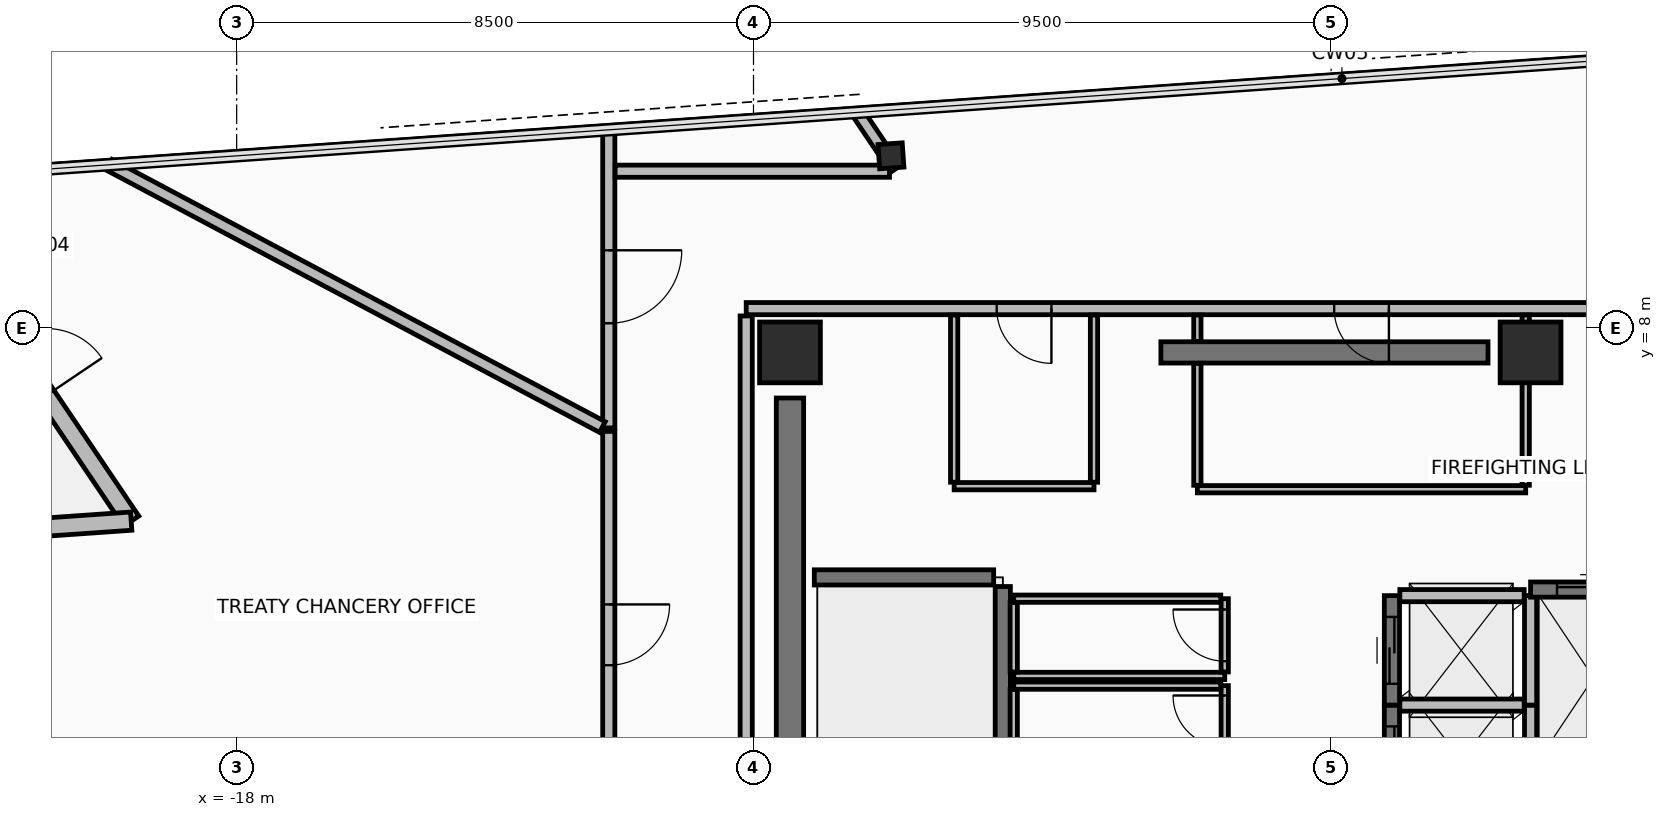
"""IFC4 building model, lengths in metres.
Left out: names, types, materials, properties, quantities, classifications, styles, units other than length and angle.
Written with IfcOpenShell. Run it as: python <this file> out.ifc"""

import sys

from ifc_helpers import new_model, si_unit, direction, frame, frame_2d, origin, origin_2d, place, context, subcontext, project, spatial, rectangle, hollow_rectangle, extrude, element, fill, save


model = new_model("IFC4")
c1 = context("Model", 3, precision=1e-05, world=origin(), true_north=direction((0.0, 1.0)))
c2 = subcontext(c1, "Body", "Model", "MODEL_VIEW")
j1 = project(units=[si_unit("LENGTHUNIT", "METRE"), si_unit("PLANEANGLEUNIT", "RADIAN")], contexts=[c1])
p1 = place(None, origin())
s1 = spatial("IfcSite", under=j1, at=p1, CompositionType="ELEMENT")
p2 = place(p1, origin())
s2 = spatial("IfcBuilding", under=s1, at=p2, CompositionType="ELEMENT")
p3 = place(p2, frame((0.0, 0.0, 275.0)))
s3 = spatial("IfcBuildingStorey", under=s2, at=p3, CompositionType="ELEMENT", Elevation=275.0)
for number, where, z_axis, x_axis in (
    (1, (3.28, 7.6, 0.0), (0.0, 0.0, 1.0), (1.0, 0.0, 0.0)),
    (2, (-8.9, 7.6, 0.0), (0.0, 0.0, 1.0), (1.0, 0.0, 0.0)),
):
    element("IfcColumn", number, at=place(p3, frame(where, z_axis=z_axis, x_axis=x_axis)), inside=s3, PredefinedType="COLUMN", context=c2, shape_type="SweptSolid", body=[
        extrude(rectangle(XDim=1.0, YDim=1.0, at=origin_2d()), origin(), (0.0, 0.0, 1.0), 4.75),
    ])
p4 = place(p3, frame((-7.24, 10.833, 0.0), z_axis=(0.0, 0.0, 1.0), x_axis=(0.99756392851, 0.069758214822, 0.0)))
e3 = element("IfcColumn", 3, at=p4, inside=s3, PredefinedType="COLUMN", context=c2, shape_type="SweptSolid", body=[
    extrude(hollow_rectangle(XDim=0.4, YDim=0.4, WallThickness=0.025, at=origin_2d()), origin(), (0.0, 0.0, 1.0), 4.75),
])
p5 = place(p3, frame((-23.526, 10.446, 0.0), z_axis=(0.0, 0.0, 1.0), x_axis=(0.559187716425, -0.829041071238, 0.0)))
e4 = element("IfcWall", 4, at=p5, inside=s3, PredefinedType="STANDARD", context=c2, shape_type="SweptSolid", body=[
    extrude(rectangle(XDim=6.78, YDim=0.3, at=frame_2d((3.39, 0.0))), origin(), (0.0, 0.0, 1.0), 2.255),
])
p6 = place(p5, frame((3.186, 0.0, 0.0)))
e5 = element("IfcOpeningElement", 5, at=p6, cuts=e4, PredefinedType="OPENING", context=c2, shape_type="SweptSolid", body=[
    extrude(rectangle(XDim=1.1, YDim=2.2, at=frame_2d((0.55, 1.1))), frame((0.0, 0.16, 0.0), z_axis=(0.0, -1.0, 0.0), x_axis=(1.0, 0.0, 0.0)), (0.0, 0.0, 1.0), 0.32),
])
p7 = place(p3, frame((-19.735, 4.825, 0.0), z_axis=(0.0, 0.0, 1.0), x_axis=(-0.997564507468, -0.06974993506, 0.0)))
e6 = element("IfcWall", 6, at=p7, inside=s3, PredefinedType="STANDARD", context=c2, shape_type="SweptSolid", body=[
    extrude(rectangle(XDim=6.78, YDim=0.3, at=frame_2d((3.39, 0.0))), origin(), (0.0, 0.0, 1.0), 2.255),
])
p8 = place(p3, frame((-2.8, 7.6, 0.0), z_axis=(0.0, 0.0, 1.0), x_axis=(1.0, 0.0, 0.0)))
e7 = element("IfcWall", 7, at=p8, inside=s3, PredefinedType="SHEAR", context=c2, shape_type="SweptSolid", body=[
    extrude(rectangle(XDim=5.38, YDim=0.35, at=frame_2d((2.69, 0.0))), origin(), (0.0, 0.0, 1.0), 4.56),
])
p9 = place(p3, frame((-8.9, -3.85, 0.0), z_axis=(0.0, 0.0, 1.0), x_axis=(0.0, 1.0, 0.0)))
e8 = element("IfcWall", 8, at=p9, inside=s3, PredefinedType="SHEAR", context=c2, shape_type="SweptSolid", body=[
    extrude(rectangle(XDim=10.7, YDim=0.45, at=frame_2d((5.35, 0.0))), origin(), (0.0, 0.0, 1.0), 4.56),
])
p10 = place(p3, frame((9.62, 8.32, 0.0), z_axis=(0.0, 0.0, 1.0), x_axis=(-1.0, 0.0, 0.0)))
e9 = element("IfcWall", 9, at=p10, inside=s3, PredefinedType="PARTITIONING", context=c2, shape_type="SweptSolid", body=[
    extrude(rectangle(XDim=19.24, YDim=0.2, at=frame_2d((9.62, 0.0))), origin(), (0.0, 0.0, 1.0), 2.355),
])
p11 = place(p10, frame((8.67, 0.0, 0.0)))
e10 = element("IfcOpeningElement", 10, at=p11, cuts=e9, PredefinedType="OPENING", context=c2, shape_type="SweptSolid", body=[
    extrude(rectangle(XDim=0.9, YDim=2.1, at=frame_2d((0.45, 1.05))), frame((0.0, 0.11, 0.0), z_axis=(0.0, -1.0, 0.0), x_axis=(1.0, 0.0, 0.0)), (0.0, 0.0, 1.0), 0.22),
])
p12 = place(p10, frame((14.22, 0.0, 0.0)))
e11 = element("IfcOpeningElement", 11, at=p12, cuts=e9, PredefinedType="OPENING", context=c2, shape_type="SweptSolid", body=[
    extrude(rectangle(XDim=0.9, YDim=2.1, at=frame_2d((0.45, 1.05))), frame((0.0, 0.11, 0.0), z_axis=(0.0, -1.0, 0.0), x_axis=(1.0, 0.0, 0.0)), (0.0, 0.0, 1.0), 0.22),
])
p13 = place(p3, frame((-9.62, 8.2, 0.0), z_axis=(0.0, 0.0, 1.0), x_axis=(0.0, -1.0, 0.0)))
e12 = element("IfcWall", 12, at=p13, inside=s3, PredefinedType="PARTITIONING", context=c2, shape_type="SweptSolid", body=[
    extrude(rectangle(XDim=16.4, YDim=0.2, at=frame_2d((8.2, 0.0))), origin(), (0.0, 0.0, 1.0), 2.355),
])
p14 = place(p13, frame((12.65, 0.0, 0.0)))
e13 = element("IfcOpeningElement", 13, at=p14, cuts=e12, PredefinedType="OPENING", context=c2, shape_type="SweptSolid", body=[
    extrude(rectangle(XDim=1.1, YDim=2.15, at=frame_2d((0.55, 1.075))), frame((0.0, 0.11, 0.0), z_axis=(0.0, -1.0, 0.0), x_axis=(1.0, 0.0, 0.0)), (0.0, 0.0, 1.0), 0.22),
])
p15 = place(p3, frame((-5.4, -3.55, 0.0), z_axis=(0.0, 0.0, 1.0), x_axis=(0.0, 1.0, 0.0)))
e14 = element("IfcWall", 14, at=p15, inside=s3, PredefinedType="SHEAR", context=c2, shape_type="SweptSolid", body=[
    extrude(rectangle(XDim=7.3, YDim=0.25, at=frame_2d((3.65, 0.0))), origin(), (0.0, 0.0, 1.0), 4.56),
])
p16 = place(p3, frame((-8.5, 3.9, 0.0), z_axis=(0.0, 0.0, 1.0), x_axis=(1.0, 0.0, 0.0)))
e15 = element("IfcWall", 15, at=p16, inside=s3, PredefinedType="SHEAR", context=c2, shape_type="SweptSolid", body=[
    extrude(rectangle(XDim=2.95, YDim=0.25, at=frame_2d((1.475, 0.0))), origin(), (0.0, 0.0, 1.0), 4.56),
])
p17 = place(p3, frame((1.0, 0.0, 0.0), z_axis=(0.0, 0.0, 1.0), x_axis=(0.0, 1.0, 0.0)))
e16 = element("IfcWall", 16, at=p17, inside=s3, PredefinedType="SHEAR", context=c2, shape_type="SweptSolid", body=[
    extrude(rectangle(XDim=1.8, YDim=0.25, at=frame_2d((0.9, 0.0))), origin(), (0.0, 0.0, 1.0), 4.56),
])
p18 = place(p17, frame((0.35, 0.0, 0.0)))
e17 = element("IfcOpeningElement", 17, at=p18, cuts=e16, PredefinedType="OPENING", context=c2, shape_type="SweptSolid", body=[
    extrude(rectangle(XDim=1.1, YDim=2.2, at=frame_2d((0.55, 1.1))), frame((0.0, 0.135, 0.0), z_axis=(0.0, -1.0, 0.0), x_axis=(1.0, 0.0, 0.0)), (0.0, 0.0, 1.0), 0.27),
])
p19 = place(p3, frame((3.28, 0.0, 0.0), z_axis=(0.0, 0.0, 1.0), x_axis=(0.0, 1.0, 0.0)))
e18 = element("IfcWall", 18, at=p19, inside=s3, PredefinedType="PARTITIONING", context=c2, shape_type="SweptSolid", body=[
    extrude(rectangle(XDim=1.8, YDim=0.2, at=frame_2d((0.9, 0.0))), origin(), (0.0, 0.0, 1.0), 4.56),
])
p20 = place(p3, frame((1.13, 1.8, 0.0), z_axis=(0.0, 0.0, 1.0), x_axis=(1.0, 0.0, 0.0)))
e19 = element("IfcWall", 19, at=p20, inside=s3, PredefinedType="PARTITIONING", context=c2, shape_type="SweptSolid", body=[
    extrude(rectangle(XDim=2.045, YDim=0.2, at=frame_2d((1.022, 0.0))), origin(), (0.0, 0.0, 1.0), 4.56),
])
p21 = place(p3, frame((1.0, 1.8, 0.0), z_axis=(0.0, 0.0, 1.0), x_axis=(0.0, 1.0, 0.0)))
e20 = element("IfcWall", 20, at=p21, inside=s3, PredefinedType="SHEAR", context=c2, shape_type="SweptSolid", body=[
    extrude(rectangle(XDim=1.8, YDim=0.25, at=frame_2d((0.9, 0.0))), origin(), (0.0, 0.0, 1.0), 4.56),
])
p22 = place(p21, frame((0.35, 0.0, 0.0)))
e21 = element("IfcOpeningElement", 21, at=p22, cuts=e20, PredefinedType="OPENING", context=c2, shape_type="SweptSolid", body=[
    extrude(rectangle(XDim=1.1, YDim=2.2, at=frame_2d((0.55, 1.1))), frame((0.0, 0.135, 0.0), z_axis=(0.0, -1.0, 0.0), x_axis=(1.0, 0.0, 0.0)), (0.0, 0.0, 1.0), 0.27),
])
p23 = place(p3, frame((3.28, 1.8, 0.0), z_axis=(0.0, 0.0, 1.0), x_axis=(0.0, 1.0, 0.0)))
e22 = element("IfcWall", 22, at=p23, inside=s3, PredefinedType="PARTITIONING", context=c2, shape_type="SweptSolid", body=[
    extrude(rectangle(XDim=1.8, YDim=0.2, at=frame_2d((0.9, 0.0))), origin(), (0.0, 0.0, 1.0), 4.56),
])
p24 = place(p3, frame((1.13, 3.6, 0.0), z_axis=(0.0, 0.0, 1.0), x_axis=(1.0, 0.0, 0.0)))
e23 = element("IfcWall", 23, at=p24, inside=s3, PredefinedType="PARTITIONING", context=c2, shape_type="SweptSolid", body=[
    extrude(rectangle(XDim=2.045, YDim=0.2, at=frame_2d((1.022, 0.0))), origin(), (0.0, 0.0, 1.0), 3.855),
])
p25 = place(p3, frame((3.28, 3.7, 0.0), z_axis=(0.0, 0.0, 1.0), x_axis=(1.0, 0.0, 0.0)))
e24 = element("IfcWall", 24, at=p25, inside=s3, PredefinedType="SHEAR", context=c2, shape_type="SweptSolid", body=[
    extrude(rectangle(XDim=2.07, YDim=0.25, at=frame_2d((1.035, 0.0))), origin(), (0.0, 0.0, 1.0), 4.56),
])
p26 = place(p25, frame((0.435, 0.0, 0.0)))
e25 = element("IfcOpeningElement", 25, at=p26, cuts=e24, PredefinedType="OPENING", context=c2, shape_type="SweptSolid", body=[
    extrude(rectangle(XDim=1.2, YDim=2.2, at=frame_2d((0.6, 1.1))), frame((0.0, 0.135, 0.0), z_axis=(0.0, -1.0, 0.0), x_axis=(1.0, 0.0, 0.0)), (0.0, 0.0, 1.0), 0.27),
])
p27 = place(p3, frame((-5.22, 2.28, 0.0), z_axis=(0.0, 0.0, 1.0), x_axis=(1.0, 0.0, 0.0)))
e26 = element("IfcWall", 26, at=p27, inside=s3, PredefinedType="PARTITIONING", context=c2, shape_type="SweptSolid", body=[
    extrude(rectangle(XDim=3.47, YDim=0.12, at=frame_2d((1.735, 0.0))), origin(), (0.0, 0.0, 1.0), 4.56),
])
p28 = place(p3, frame((-1.75, 2.345, 0.0), z_axis=(0.0, 0.0, 1.0), x_axis=(0.0, 1.0, 0.0)))
e27 = element("IfcWall", 27, at=p28, inside=s3, PredefinedType="PARTITIONING", context=c2, shape_type="SweptSolid", body=[
    extrude(rectangle(XDim=1.205, YDim=0.12, at=frame_2d((0.603, 0.0))), origin(), (0.0, 0.0, 1.0), 4.56),
])
p29 = place(p28, frame((0.177, 0.0, 0.0)))
e28 = element("IfcOpeningElement", 28, at=p29, cuts=e27, PredefinedType="OPENING", context=c2, shape_type="SweptSolid", body=[
    extrude(rectangle(XDim=0.85, YDim=2.1, at=frame_2d((0.425, 1.05))), frame((0.0, 0.07, 0.0), z_axis=(0.0, -1.0, 0.0), x_axis=(1.0, 0.0, 0.0)), (0.0, 0.0, 1.0), 0.14),
])
p30 = place(p3, frame((-1.815, 3.55, 0.0), z_axis=(0.0, 0.0, 1.0), x_axis=(-1.0, 0.0, 0.0)))
e29 = element("IfcWall", 29, at=p30, inside=s3, PredefinedType="PARTITIONING", context=c2, shape_type="SweptSolid", body=[
    extrude(rectangle(XDim=3.405, YDim=0.12, at=frame_2d((1.703, 0.0))), origin(), (0.0, 0.0, 1.0), 4.56),
])
p31 = place(p3, frame((-5.22, 3.485, 0.0), z_axis=(0.0, 0.0, 1.0), x_axis=(0.0, -1.0, 0.0)))
e30 = element("IfcWall", 30, at=p31, inside=s3, PredefinedType="PARTITIONING", context=c2, shape_type="SweptSolid", body=[
    extrude(rectangle(XDim=1.14, YDim=0.12, at=frame_2d((0.57, 0.0))), origin(), (0.0, 0.0, 1.0), 4.56),
])
p32 = place(p3, frame((-1.75, 0.945, 0.0), z_axis=(0.0, 0.0, 1.0), x_axis=(0.0, 1.0, 0.0)))
e31 = element("IfcWall", 31, at=p32, inside=s3, PredefinedType="PARTITIONING", context=c2, shape_type="SweptSolid", body=[
    extrude(rectangle(XDim=1.175, YDim=0.12, at=frame_2d((0.587, 0.0))), origin(), (0.0, 0.0, 1.0), 4.56),
])
p33 = place(p32, frame((0.163, 0.0, 0.0)))
e32 = element("IfcOpeningElement", 32, at=p33, cuts=e31, PredefinedType="OPENING", context=c2, shape_type="SweptSolid", body=[
    extrude(rectangle(XDim=0.85, YDim=2.1, at=frame_2d((0.425, 1.05))), frame((0.0, 0.07, 0.0), z_axis=(0.0, -1.0, 0.0), x_axis=(1.0, 0.0, 0.0)), (0.0, 0.0, 1.0), 0.14),
])
p34 = place(p3, frame((-1.815, 2.12, 0.0), z_axis=(0.0, 0.0, 1.0), x_axis=(-1.0, 0.0, 0.0)))
e33 = element("IfcWall", 33, at=p34, inside=s3, PredefinedType="PARTITIONING", context=c2, shape_type="SweptSolid", body=[
    extrude(rectangle(XDim=3.405, YDim=0.12, at=frame_2d((1.703, 0.0))), origin(), (0.0, 0.0, 1.0), 4.56),
])
p35 = place(p3, frame((-5.22, 2.055, 0.0), z_axis=(0.0, 0.0, 1.0), x_axis=(0.0, -1.0, 0.0)))
e34 = element("IfcWall", 34, at=p35, inside=s3, PredefinedType="PARTITIONING", context=c2, shape_type="SweptSolid", body=[
    extrude(rectangle(XDim=1.11, YDim=0.12, at=frame_2d((0.555, 0.0))), origin(), (0.0, 0.0, 1.0), 4.56),
])
p36 = place(p3, frame((-2.2, 5.35, 0.0), z_axis=(0.0, 0.0, 1.0), x_axis=(1.0, 0.0, 0.0)))
e35 = element("IfcWall", 35, at=p36, inside=s3, PredefinedType="PARTITIONING", context=c2, shape_type="SweptSolid", body=[
    extrude(rectangle(XDim=5.4, YDim=0.12, at=frame_2d((2.7, 0.0))), origin(), (0.0, 0.0, 1.0), 3.855),
])
p37 = place(p3, frame((3.2, 5.415, 0.0), z_axis=(0.0, 0.0, 1.0), x_axis=(0.0, 1.0, 0.0)))
e36 = element("IfcWall", 36, at=p37, inside=s3, PredefinedType="PARTITIONING", context=c2, shape_type="SweptSolid", body=[
    extrude(rectangle(XDim=2.8, YDim=0.12, at=frame_2d((1.4, 0.0))), origin(), (0.0, 0.0, 1.0), 2.355),
])
p38 = place(p3, frame((-2.2, 8.215, 0.0), z_axis=(0.0, 0.0, 1.0), x_axis=(0.0, -1.0, 0.0)))
e37 = element("IfcWall", 37, at=p38, inside=s3, PredefinedType="PARTITIONING", context=c2, shape_type="SweptSolid", body=[
    extrude(rectangle(XDim=0.435, YDim=0.12, at=frame_2d((0.218, 0.0))), origin(), (0.0, 0.0, 1.0), 2.355),
])
p39 = place(p3, frame((-2.2, 7.42, 0.0), z_axis=(0.0, 0.0, 1.0), x_axis=(0.0, -1.0, 0.0)))
e38 = element("IfcWall", 38, at=p39, inside=s3, PredefinedType="PARTITIONING", context=c2, shape_type="SweptSolid", body=[
    extrude(rectangle(XDim=2.005, YDim=0.12, at=frame_2d((1.002, 0.0))), origin(), (0.0, 0.0, 1.0), 3.855),
])
p40 = place(p3, frame((-6.2, 5.4, 0.0), z_axis=(0.0, 0.0, 1.0), x_axis=(1.0, 0.0, 0.0)))
e39 = element("IfcWall", 39, at=p40, inside=s3, PredefinedType="PARTITIONING", context=c2, shape_type="SweptSolid", body=[
    extrude(rectangle(XDim=2.3, YDim=0.12, at=frame_2d((1.15, 0.0))), origin(), (0.0, 0.0, 1.0), 4.56),
])
for number, where, z_axis, x_axis in (
    (40, (-3.9, 5.465, 0.0), (0.0, 0.0, 1.0), (0.0, 1.0, 0.0)),
    (41, (-6.2, 8.215, 0.0), (0.0, 0.0, 1.0), (0.0, -1.0, 0.0)),
):
    element("IfcWall", number, at=place(p3, frame(where, z_axis=z_axis, x_axis=x_axis)), inside=s3, PredefinedType="PARTITIONING", context=c2, shape_type="SweptSolid", body=[
        extrude(rectangle(XDim=2.75, YDim=0.12, at=frame_2d((1.375, 0.0))), origin(), (0.0, 0.0, 1.0), 3.855),
    ])
p41 = place(p3, frame((-11.88, 11.26, 0.0), z_axis=(0.0, 0.0, 1.0), x_axis=(0.0, -1.0, 0.0)))
e42 = element("IfcWall", 42, at=p41, inside=s3, PredefinedType="PARTITIONING", context=c2, shape_type="SweptSolid", body=[
    extrude(rectangle(XDim=4.902, YDim=0.2, at=frame_2d((2.451, 0.0))), origin(), (0.0, 0.0, 1.0), 2.255),
])
p42 = place(p41, frame((1.981, 0.0, 0.0)))
e43 = element("IfcOpeningElement", 43, at=p42, cuts=e42, PredefinedType="OPENING", context=c2, shape_type="SweptSolid", body=[
    extrude(rectangle(XDim=1.2, YDim=2.15, at=frame_2d((0.6, 1.075))), frame((0.0, 0.11, 0.0), z_axis=(0.0, -1.0, 0.0), x_axis=(1.0, 0.0, 0.0)), (0.0, 0.0, 1.0), 0.22),
])
p43 = place(p3, frame((-11.985, 6.373, 0.0), z_axis=(0.0, 0.0, 1.0), x_axis=(-0.882948796651, 0.469469298776, 0.0)))
e44 = element("IfcWall", 44, at=p43, inside=s3, PredefinedType="PARTITIONING", context=c2, shape_type="SweptSolid", body=[
    extrude(rectangle(XDim=9.188, YDim=0.2, at=frame_2d((4.594, 0.0))), origin(), (0.0, 0.0, 1.0), 2.255),
])
p44 = place(p3, frame((-7.78, 11.535, 0.0), z_axis=(0.0, 0.0, 1.0), x_axis=(0.559180531027, -0.82904591774, 0.0)))
e45 = element("IfcWall", 45, at=p44, inside=s3, PredefinedType="PARTITIONING", context=c2, shape_type="SweptSolid", body=[
    extrude(rectangle(XDim=1.104, YDim=0.2, at=frame_2d((0.552, 0.0))), origin(), (0.0, 0.0, 1.0), 2.255),
])
p45 = place(p3, frame((-7.263, 10.58, 0.0), z_axis=(0.0, 0.0, 1.0), x_axis=(-1.0, 0.0, 0.0)))
e46 = element("IfcWall", 46, at=p45, inside=s3, PredefinedType="PARTITIONING", context=c2, shape_type="SweptSolid", body=[
    extrude(rectangle(XDim=4.512, YDim=0.2, at=frame_2d((2.256, 0.0))), origin(), (0.0, 0.0, 1.0), 2.255),
])
p46 = place(p3, frame((-11.88, 6.302, 0.0), z_axis=(0.0, 0.0, 1.0), x_axis=(0.0, -1.0, 0.0)))
e47 = element("IfcWall", 47, at=p46, inside=s3, PredefinedType="PARTITIONING", context=c2, shape_type="SweptSolid", body=[
    extrude(rectangle(XDim=6.692, YDim=0.2, at=frame_2d((3.346, 0.0))), origin(), (0.0, 0.0, 1.0), 2.355),
])
p47 = place(p46, frame((2.846, 0.0, 0.0)))
e48 = element("IfcOpeningElement", 48, at=p47, cuts=e47, PredefinedType="OPENING", context=c2, shape_type="SweptSolid", body=[
    extrude(rectangle(XDim=1.0, YDim=2.15, at=frame_2d((0.5, 1.075))), frame((0.0, 0.11, 0.0), z_axis=(0.0, -1.0, 0.0), x_axis=(1.0, 0.0, 0.0)), (0.0, 0.0, 1.0), 0.22),
])
p48 = place(p18, origin())
e49 = element("IfcDoor", 49, at=p48, inside=s3, OperationType="SLIDING_TO_LEFT", PredefinedType="DOOR", context=c2, shape_type="SweptSolid", body=[
    extrude(rectangle(XDim=1.1, YDim=2.2, at=frame_2d((0.55, 1.1))), frame((0.0, 0.025, 0.0), z_axis=(0.0, -1.0, 0.0), x_axis=(1.0, 0.0, 0.0)), (0.0, 0.0, 1.0), 0.05),
])
fill(e17, e49)
p49 = place(p22, origin())
e50 = element("IfcDoor", 50, at=p49, inside=s3, OperationType="SLIDING_TO_LEFT", PredefinedType="DOOR", context=c2, shape_type="SweptSolid", body=[
    extrude(rectangle(XDim=1.1, YDim=2.2, at=frame_2d((0.55, 1.1))), frame((0.0, 0.025, 0.0), z_axis=(0.0, -1.0, 0.0), x_axis=(1.0, 0.0, 0.0)), (0.0, 0.0, 1.0), 0.05),
])
fill(e21, e50)
p50 = place(p26, origin())
e51 = element("IfcDoor", 51, at=p50, inside=s3, OperationType="SLIDING_TO_RIGHT", PredefinedType="DOOR", context=c2, shape_type="SweptSolid", body=[
    extrude(rectangle(XDim=1.2, YDim=2.2, at=frame_2d((0.6, 1.1))), frame((0.0, 0.025, 0.0), z_axis=(0.0, -1.0, 0.0), x_axis=(1.0, 0.0, 0.0)), (0.0, 0.0, 1.0), 0.05),
])
fill(e25, e51)
p51 = place(p29, frame((0.85, 0.0, 0.0), z_axis=(0.0, 0.0, 1.0), x_axis=(-1.0, 0.0, 0.0)))
e52 = element("IfcDoor", 52, at=p51, inside=s3, OperationType="SINGLE_SWING_RIGHT", PredefinedType="DOOR", context=c2, shape_type="SweptSolid", body=[
    extrude(rectangle(XDim=0.85, YDim=2.1, at=frame_2d((0.425, 1.05))), frame((0.0, 0.025, 0.0), z_axis=(0.0, -1.0, 0.0), x_axis=(1.0, 0.0, 0.0)), (0.0, 0.0, 1.0), 0.05),
])
fill(e28, e52)
p52 = place(p33, frame((0.85, 0.0, 0.0), z_axis=(0.0, 0.0, 1.0), x_axis=(-1.0, 0.0, 0.0)))
e53 = element("IfcDoor", 53, at=p52, inside=s3, OperationType="SINGLE_SWING_RIGHT", PredefinedType="DOOR", context=c2, shape_type="SweptSolid", body=[
    extrude(rectangle(XDim=0.85, YDim=2.1, at=frame_2d((0.425, 1.05))), frame((0.0, 0.025, 0.0), z_axis=(0.0, -1.0, 0.0), x_axis=(1.0, 0.0, 0.0)), (0.0, 0.0, 1.0), 0.05),
])
fill(e32, e53)
p53 = place(p11, origin())
e54 = element("IfcDoor", 54, at=p53, inside=s3, OperationType="SINGLE_SWING_LEFT", PredefinedType="DOOR", context=c2, shape_type="SweptSolid", body=[
    extrude(rectangle(XDim=0.9, YDim=2.1, at=frame_2d((0.45, 1.05))), frame((0.0, 0.025, 0.0), z_axis=(0.0, -1.0, 0.0), x_axis=(1.0, 0.0, 0.0)), (0.0, 0.0, 1.0), 0.05),
])
fill(e10, e54)
p54 = place(p12, origin())
e55 = element("IfcDoor", 55, at=p54, inside=s3, OperationType="SINGLE_SWING_LEFT", PredefinedType="DOOR", context=c2, shape_type="SweptSolid", body=[
    extrude(rectangle(XDim=0.9, YDim=2.1, at=frame_2d((0.45, 1.05))), frame((0.0, 0.025, 0.0), z_axis=(0.0, -1.0, 0.0), x_axis=(1.0, 0.0, 0.0)), (0.0, 0.0, 1.0), 0.05),
])
fill(e11, e55)
p55 = place(p42, origin())
e56 = element("IfcDoor", 56, at=p55, inside=s3, OperationType="SINGLE_SWING_LEFT", PredefinedType="DOOR", context=c2, shape_type="SweptSolid", body=[
    extrude(rectangle(XDim=1.2, YDim=2.15, at=frame_2d((0.6, 1.075))), frame((0.0, 0.025, 0.0), z_axis=(0.0, -1.0, 0.0), x_axis=(1.0, 0.0, 0.0)), (0.0, 0.0, 1.0), 0.05),
])
fill(e43, e56)
p56 = place(p47, origin())
e57 = element("IfcDoor", 57, at=p56, inside=s3, OperationType="SINGLE_SWING_RIGHT", PredefinedType="DOOR", context=c2, shape_type="SweptSolid", body=[
    extrude(rectangle(XDim=1.0, YDim=2.15, at=frame_2d((0.5, 1.075))), frame((0.0, 0.025, 0.0), z_axis=(0.0, -1.0, 0.0), x_axis=(1.0, 0.0, 0.0)), (0.0, 0.0, 1.0), 0.05),
])
fill(e48, e57)
save(model, sys.argv[1])
